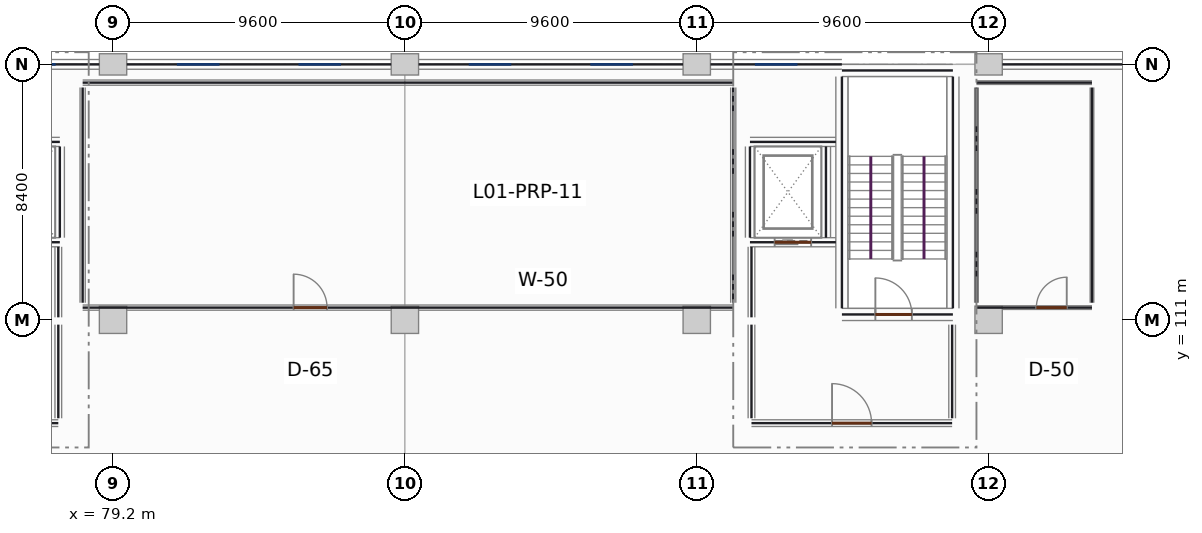
"""IFC4 building model, lengths in metres.
Left out: names, types, materials, properties, quantities, classifications, styles, units other than length and angle.
Written with IfcOpenShell. Run it as: python <this file> out.ifc"""

import sys

from ifc_helpers import new_model, si_unit, direction, frame, frame_2d, origin, origin_2d, place, context, subcontext, project, spatial, rectangle, extrude, element, fill, save


model = new_model("IFC4")
c1 = context("Model", 3, precision=1e-05, world=origin(), true_north=direction((0.0, 1.0)))
c2 = subcontext(c1, "Body", "Model", "MODEL_VIEW")
j1 = project(units=[si_unit("LENGTHUNIT", "METRE"), si_unit("PLANEANGLEUNIT", "RADIAN")], contexts=[c1])
p1 = place(None, origin())
s1 = spatial("IfcSite", under=j1, at=p1, CompositionType="ELEMENT")
p2 = place(p1, origin())
s2 = spatial("IfcBuilding", under=s1, at=p2, CompositionType="ELEMENT")
p3 = place(p2, frame((0.0, 0.0, 5.4)))
s3 = spatial("IfcBuildingStorey", under=s2, at=p3, CompositionType="ELEMENT", Elevation=5.4)
p4 = place(p3, frame((79.2, 111.0, 0.0), z_axis=(0.0, 0.0, 1.0), x_axis=(1.0, 0.0, 0.0)))
e1 = element("IfcColumn", 1, at=p4, inside=s3, PredefinedType="COLUMN", context=c2, shape_type="SweptSolid", body=[
    extrude(rectangle(XDim=0.9, YDim=0.9, at=origin_2d()), origin(), (0.0, 0.0, 1.0), 4.18),
])
p5 = place(p3, frame((79.2, 119.4, 0.0), z_axis=(0.0, 0.0, 1.0), x_axis=(1.0, 0.0, 0.0)))
e2 = element("IfcColumn", 2, at=p5, inside=s3, PredefinedType="COLUMN", context=c2, shape_type="SweptSolid", body=[
    extrude(rectangle(XDim=0.9, YDim=0.7, at=origin_2d()), origin(), (0.0, 0.0, 1.0), 4.18),
])
p6 = place(p3, frame((88.8, 111.0, 0.0), z_axis=(0.0, 0.0, 1.0), x_axis=(1.0, 0.0, 0.0)))
e3 = element("IfcColumn", 3, at=p6, inside=s3, PredefinedType="COLUMN", context=c2, shape_type="SweptSolid", body=[
    extrude(rectangle(XDim=0.9, YDim=0.9, at=origin_2d()), origin(), (0.0, 0.0, 1.0), 4.18),
])
p7 = place(p3, frame((88.8, 119.4, 0.0), z_axis=(0.0, 0.0, 1.0), x_axis=(1.0, 0.0, 0.0)))
e4 = element("IfcColumn", 4, at=p7, inside=s3, PredefinedType="COLUMN", context=c2, shape_type="SweptSolid", body=[
    extrude(rectangle(XDim=0.9, YDim=0.7, at=origin_2d()), origin(), (0.0, 0.0, 1.0), 4.18),
])
p8 = place(p3, frame((98.4, 111.0, 0.0), z_axis=(0.0, 0.0, 1.0), x_axis=(1.0, 0.0, 0.0)))
e5 = element("IfcColumn", 5, at=p8, inside=s3, PredefinedType="COLUMN", context=c2, shape_type="SweptSolid", body=[
    extrude(rectangle(XDim=0.9, YDim=0.9, at=origin_2d()), origin(), (0.0, 0.0, 1.0), 4.18),
])
p9 = place(p3, frame((98.4, 119.4, 0.0), z_axis=(0.0, 0.0, 1.0), x_axis=(1.0, 0.0, 0.0)))
e6 = element("IfcColumn", 6, at=p9, inside=s3, PredefinedType="COLUMN", context=c2, shape_type="SweptSolid", body=[
    extrude(rectangle(XDim=0.9, YDim=0.7, at=origin_2d()), origin(), (0.0, 0.0, 1.0), 4.18),
])
p10 = place(p3, frame((108.0, 111.0, 0.0), z_axis=(0.0, 0.0, 1.0), x_axis=(1.0, 0.0, 0.0)))
e7 = element("IfcColumn", 7, at=p10, inside=s3, PredefinedType="COLUMN", context=c2, shape_type="SweptSolid", body=[
    extrude(rectangle(XDim=0.9, YDim=0.9, at=origin_2d()), origin(), (0.0, 0.0, 1.0), 4.18),
])
p11 = place(p3, frame((108.0, 119.4, 0.0), z_axis=(0.0, 0.0, 1.0), x_axis=(1.0, 0.0, 0.0)))
e8 = element("IfcColumn", 8, at=p11, inside=s3, PredefinedType="COLUMN", context=c2, shape_type="SweptSolid", body=[
    extrude(rectangle(XDim=0.9, YDim=0.7, at=origin_2d()), origin(), (0.0, 0.0, 1.0), 4.18),
])
p12 = place(p3, frame((74.476, 119.4, 0.0), z_axis=(0.0, 0.0, 1.0), x_axis=(1.0, 0.0, 0.0)))
e9 = element("IfcWall", 9, at=p12, inside=s3, PredefinedType="SOLIDWALL", context=c2, shape_type="SweptSolid", body=[
    extrude(rectangle(XDim=4.272, YDim=0.32, at=frame_2d((2.136, 0.0))), origin(), (0.0, 0.0, 1.0), 3.38),
])
p13 = place(p12, frame((1.436, 0.0, 0.9)))
e10 = element("IfcOpeningElement", 10, at=p13, cuts=e9, PredefinedType="OPENING", context=c2, shape_type="SweptSolid", body=[
    extrude(rectangle(XDim=1.4, YDim=1.65, at=frame_2d((0.7, 0.825))), frame((0.0, 0.17, 0.0), z_axis=(0.0, -1.0, 0.0), x_axis=(1.0, 0.0, 0.0)), (0.0, 0.0, 1.0), 0.34),
])
p14 = place(p3, frame((79.652, 119.4, 0.0), z_axis=(0.0, 0.0, 1.0), x_axis=(1.0, 0.0, 0.0)))
e11 = element("IfcWall", 11, at=p14, inside=s3, PredefinedType="SOLIDWALL", context=c2, shape_type="SweptSolid", body=[
    extrude(rectangle(XDim=8.696, YDim=0.32, at=frame_2d((4.348, 0.0))), origin(), (0.0, 0.0, 1.0), 3.38),
])
p15 = place(p14, frame((1.648, 0.0, 0.85)))
e12 = element("IfcOpeningElement", 12, at=p15, cuts=e11, PredefinedType="OPENING", context=c2, shape_type="SweptSolid", body=[
    extrude(rectangle(XDim=1.4, YDim=1.65, at=frame_2d((0.7, 0.825))), frame((0.0, 0.17, 0.0), z_axis=(0.0, -1.0, 0.0), x_axis=(1.0, 0.0, 0.0)), (0.0, 0.0, 1.0), 0.34),
])
p16 = place(p14, frame((5.648, 0.0, 0.85)))
e13 = element("IfcOpeningElement", 13, at=p16, cuts=e11, PredefinedType="OPENING", context=c2, shape_type="SweptSolid", body=[
    extrude(rectangle(XDim=1.4, YDim=1.65, at=frame_2d((0.7, 0.825))), frame((0.0, 0.17, 0.0), z_axis=(0.0, -1.0, 0.0), x_axis=(1.0, 0.0, 0.0)), (0.0, 0.0, 1.0), 0.34),
])
p17 = place(p3, frame((89.252, 119.4, 0.0), z_axis=(0.0, 0.0, 1.0), x_axis=(1.0, 0.0, 0.0)))
e14 = element("IfcWall", 14, at=p17, inside=s3, PredefinedType="SOLIDWALL", context=c2, shape_type="SweptSolid", body=[
    extrude(rectangle(XDim=8.696, YDim=0.32, at=frame_2d((4.348, 0.0))), origin(), (0.0, 0.0, 1.0), 3.38),
])
p18 = place(p17, frame((1.648, 0.0, 0.85)))
e15 = element("IfcOpeningElement", 15, at=p18, cuts=e14, PredefinedType="OPENING", context=c2, shape_type="SweptSolid", body=[
    extrude(rectangle(XDim=1.4, YDim=1.65, at=frame_2d((0.7, 0.825))), frame((0.0, 0.17, 0.0), z_axis=(0.0, -1.0, 0.0), x_axis=(1.0, 0.0, 0.0)), (0.0, 0.0, 1.0), 0.34),
])
p19 = place(p17, frame((5.648, 0.0, 0.85)))
e16 = element("IfcOpeningElement", 16, at=p19, cuts=e14, PredefinedType="OPENING", context=c2, shape_type="SweptSolid", body=[
    extrude(rectangle(XDim=1.4, YDim=1.65, at=frame_2d((0.7, 0.825))), frame((0.0, 0.17, 0.0), z_axis=(0.0, -1.0, 0.0), x_axis=(1.0, 0.0, 0.0)), (0.0, 0.0, 1.0), 0.34),
])
p20 = place(p3, frame((98.852, 119.4, 0.0), z_axis=(0.0, 0.0, 1.0), x_axis=(1.0, 0.0, 0.0)))
e17 = element("IfcWall", 17, at=p20, inside=s3, PredefinedType="SOLIDWALL", context=c2, shape_type="SweptSolid", body=[
    extrude(rectangle(XDim=4.322, YDim=0.32, at=frame_2d((2.161, 0.0))), origin(), (0.0, 0.0, 1.0), 3.38),
])
p21 = place(p20, frame((1.461, 0.0, 0.9)))
e18 = element("IfcOpeningElement", 18, at=p21, cuts=e17, PredefinedType="OPENING", context=c2, shape_type="SweptSolid", body=[
    extrude(rectangle(XDim=1.4, YDim=1.65, at=frame_2d((0.7, 0.825))), frame((0.0, 0.17, 0.0), z_axis=(0.0, -1.0, 0.0), x_axis=(1.0, 0.0, 0.0)), (0.0, 0.0, 1.0), 0.34),
])
p22 = place(p3, frame((108.452, 119.4, 0.0), z_axis=(0.0, 0.0, 1.0), x_axis=(1.0, 0.0, 0.0)))
e19 = element("IfcWall", 19, at=p22, inside=s3, PredefinedType="SOLIDWALL", context=c2, shape_type="SweptSolid", body=[
    extrude(rectangle(XDim=8.696, YDim=0.32, at=frame_2d((4.348, 0.0))), origin(), (0.0, 0.0, 1.0), 3.38),
])
p23 = place(p22, frame((5.648, 0.0, 0.85)))
e20 = element("IfcOpeningElement", 20, at=p23, cuts=e19, PredefinedType="OPENING", context=c2, shape_type="SweptSolid", body=[
    extrude(rectangle(XDim=1.4, YDim=1.65, at=frame_2d((0.7, 0.825))), frame((0.0, 0.17, 0.0), z_axis=(0.0, -1.0, 0.0), x_axis=(1.0, 0.0, 0.0)), (0.0, 0.0, 1.0), 0.34),
])
p24 = place(p3, frame((103.175, 111.175, 0.0), z_axis=(0.0, 0.0, 1.0), x_axis=(1.0, 0.0, 0.0)))
e21 = element("IfcWall", 21, at=p24, inside=s3, PredefinedType="SHEAR", context=c2, shape_type="SweptSolid", body=[
    extrude(rectangle(XDim=3.65, YDim=0.4, at=frame_2d((1.825, 0.0))), origin(), (0.0, 0.0, 1.0), 4.18),
])
p25 = place(p24, frame((1.1, 0.0, 0.0)))
e22 = element("IfcOpeningElement", 22, at=p25, cuts=e21, PredefinedType="OPENING", context=c2, shape_type="SweptSolid", body=[
    extrude(rectangle(XDim=1.2, YDim=2.2, at=frame_2d((0.6, 1.1))), frame((0.0, 0.21, 0.0), z_axis=(0.0, -1.0, 0.0), x_axis=(1.0, 0.0, 0.0)), (0.0, 0.0, 1.0), 0.42),
])
for number, where, z_axis, x_axis in (
    (23, (103.175, 111.375, 0.0), (0.0, 0.0, 1.0), (0.0, 1.0, 0.0)),
    (24, (106.825, 111.375, 0.0), (0.0, 0.0, 1.0), (0.0, 1.0, 0.0)),
):
    element("IfcWall", number, at=place(p3, frame(where, z_axis=z_axis, x_axis=x_axis)), inside=s3, PredefinedType="SHEAR", context=c2, shape_type="SweptSolid", body=[
        extrude(rectangle(XDim=7.625, YDim=0.4, at=frame_2d((3.812, 0.0))), origin(), (0.0, 0.0, 1.0), 4.18),
    ])
p26 = place(p3, frame((103.175, 119.2, 0.0), z_axis=(0.0, 0.0, 1.0), x_axis=(1.0, 0.0, 0.0)))
e25 = element("IfcWall", 25, at=p26, inside=s3, PredefinedType="SHEAR", context=c2, shape_type="SweptSolid", body=[
    extrude(rectangle(XDim=3.65, YDim=0.4, at=frame_2d((1.825, 0.0))), origin(), (0.0, 0.0, 1.0), 4.18),
])
p27 = place(p3, frame((74.7, 113.55, 0.0), z_axis=(0.0, 0.0, 1.0), x_axis=(1.0, 0.0, 0.0)))
e26 = element("IfcWall", 26, at=p27, inside=s3, PredefinedType="SHEAR", context=c2, shape_type="SweptSolid", body=[
    extrude(rectangle(XDim=2.75, YDim=0.3, at=frame_2d((1.375, 0.0))), origin(), (0.0, 0.0, 1.0), 4.18),
])
p28 = place(p27, frame((0.775, 0.0, 0.0)))
e27 = element("IfcOpeningElement", 27, at=p28, cuts=e26, PredefinedType="OPENING", context=c2, shape_type="SweptSolid", body=[
    extrude(rectangle(XDim=1.2, YDim=2.2, at=frame_2d((0.6, 1.1))), frame((0.0, 0.16, 0.0), z_axis=(0.0, -1.0, 0.0), x_axis=(1.0, 0.0, 0.0)), (0.0, 0.0, 1.0), 0.32),
])
p29 = place(p3, frame((74.7, 116.85, 0.0), z_axis=(0.0, 0.0, 1.0), x_axis=(1.0, 0.0, 0.0)))
e28 = element("IfcWall", 28, at=p29, inside=s3, PredefinedType="SHEAR", context=c2, shape_type="SweptSolid", body=[
    extrude(rectangle(XDim=2.75, YDim=0.3, at=frame_2d((1.375, 0.0))), origin(), (0.0, 0.0, 1.0), 4.18),
])
p30 = place(p3, frame((77.45, 113.7, 0.0), z_axis=(0.0, 0.0, 1.0), x_axis=(0.0, 1.0, 0.0)))
e29 = element("IfcWall", 29, at=p30, inside=s3, PredefinedType="SHEAR", context=c2, shape_type="SweptSolid", body=[
    extrude(rectangle(XDim=3.0, YDim=0.3, at=frame_2d((1.5, 0.0))), origin(), (0.0, 0.0, 1.0), 4.18),
])
p31 = place(p3, frame((100.15, 113.55, 0.0), z_axis=(0.0, 0.0, 1.0), x_axis=(1.0, 0.0, 0.0)))
e30 = element("IfcWall", 30, at=p31, inside=s3, PredefinedType="SHEAR", context=c2, shape_type="SweptSolid", body=[
    extrude(rectangle(XDim=2.825, YDim=0.3, at=frame_2d((1.413, 0.0))), origin(), (0.0, 0.0, 1.0), 4.18),
])
p32 = place(p31, frame((0.812, 0.0, 0.0)))
e31 = element("IfcOpeningElement", 31, at=p32, cuts=e30, PredefinedType="OPENING", context=c2, shape_type="SweptSolid", body=[
    extrude(rectangle(XDim=1.2, YDim=2.2, at=frame_2d((0.6, 1.1))), frame((0.0, 0.16, 0.0), z_axis=(0.0, -1.0, 0.0), x_axis=(1.0, 0.0, 0.0)), (0.0, 0.0, 1.0), 0.32),
])
p33 = place(p3, frame((100.15, 116.85, 0.0), z_axis=(0.0, 0.0, 1.0), x_axis=(1.0, 0.0, 0.0)))
e32 = element("IfcWall", 32, at=p33, inside=s3, PredefinedType="SHEAR", context=c2, shape_type="SweptSolid", body=[
    extrude(rectangle(XDim=2.825, YDim=0.3, at=frame_2d((1.413, 0.0))), origin(), (0.0, 0.0, 1.0), 4.18),
])
for number, where, z_axis, x_axis in (
    (33, (100.15, 113.7, 0.0), (0.0, 0.0, 1.0), (0.0, 1.0, 0.0)),
    (34, (102.65, 113.7, 0.0), (0.0, 0.0, 1.0), (0.0, 1.0, 0.0)),
):
    element("IfcWall", number, at=place(p3, frame(where, z_axis=z_axis, x_axis=x_axis)), inside=s3, PredefinedType="SHEAR", context=c2, shape_type="SweptSolid", body=[
        extrude(rectangle(XDim=3.0, YDim=0.3, at=frame_2d((1.5, 0.0))), origin(), (0.0, 0.0, 1.0), 4.18),
    ])
p34 = place(p3, frame((70.8, 107.6, 0.0), z_axis=(0.0, 0.0, 1.0), x_axis=(1.0, 0.0, 0.0)))
e35 = element("IfcWall", 35, at=p34, inside=s3, PredefinedType="PARTITIONING", context=c2, shape_type="SweptSolid", body=[
    extrude(rectangle(XDim=6.6, YDim=0.22, at=frame_2d((3.3, 0.0))), origin(), (0.0, 0.0, 1.0), 3.22),
])
p35 = place(p34, frame((2.65, 0.0, 0.0)))
e36 = element("IfcOpeningElement", 36, at=p35, cuts=e35, PredefinedType="OPENING", context=c2, shape_type="SweptSolid", body=[
    extrude(rectangle(XDim=1.3, YDim=2.2, at=frame_2d((0.65, 1.1))), frame((0.0, 0.12, 0.0), z_axis=(0.0, -1.0, 0.0), x_axis=(1.0, 0.0, 0.0)), (0.0, 0.0, 1.0), 0.24),
])
p36 = place(p3, frame((77.4, 111.08, 0.0), z_axis=(0.0, 0.0, 1.0), x_axis=(0.0, 1.0, 0.0)))
e37 = element("IfcWall", 37, at=p36, inside=s3, PredefinedType="PARTITIONING", context=c2, shape_type="SweptSolid", body=[
    extrude(rectangle(XDim=2.32, YDim=0.22, at=frame_2d((1.16, 0.0))), origin(), (0.0, 0.0, 1.0), 3.22),
])
p37 = place(p3, frame((77.4, 107.76, 0.0), z_axis=(0.0, 0.0, 1.0), x_axis=(0.0, 1.0, 0.0)))
e38 = element("IfcWall", 38, at=p37, inside=s3, PredefinedType="PARTITIONING", context=c2, shape_type="SweptSolid", body=[
    extrude(rectangle(XDim=3.08, YDim=0.22, at=frame_2d((1.54, 0.0))), origin(), (0.0, 0.0, 1.0), 3.22),
])
p38 = place(p3, frame((100.2, 107.6, 0.0), z_axis=(0.0, 0.0, 1.0), x_axis=(1.0, 0.0, 0.0)))
e39 = element("IfcWall", 39, at=p38, inside=s3, PredefinedType="PARTITIONING", context=c2, shape_type="SweptSolid", body=[
    extrude(rectangle(XDim=6.6, YDim=0.22, at=frame_2d((3.3, 0.0))), origin(), (0.0, 0.0, 1.0), 3.22),
])
p39 = place(p38, frame((2.65, 0.0, 0.0)))
e40 = element("IfcOpeningElement", 40, at=p39, cuts=e39, PredefinedType="OPENING", context=c2, shape_type="SweptSolid", body=[
    extrude(rectangle(XDim=1.3, YDim=2.2, at=frame_2d((0.65, 1.1))), frame((0.0, 0.12, 0.0), z_axis=(0.0, -1.0, 0.0), x_axis=(1.0, 0.0, 0.0)), (0.0, 0.0, 1.0), 0.24),
])
p40 = place(p3, frame((100.2, 111.08, 0.0), z_axis=(0.0, 0.0, 1.0), x_axis=(0.0, 1.0, 0.0)))
e41 = element("IfcWall", 41, at=p40, inside=s3, PredefinedType="PARTITIONING", context=c2, shape_type="SweptSolid", body=[
    extrude(rectangle(XDim=2.32, YDim=0.22, at=frame_2d((1.16, 0.0))), origin(), (0.0, 0.0, 1.0), 3.22),
])
for number, where, z_axis, x_axis in (
    (42, (100.2, 107.76, 0.0), (0.0, 0.0, 1.0), (0.0, 1.0, 0.0)),
    (43, (106.8, 107.76, 0.0), (0.0, 0.0, 1.0), (0.0, 1.0, 0.0)),
):
    element("IfcWall", number, at=place(p3, frame(where, z_axis=z_axis, x_axis=x_axis)), inside=s3, PredefinedType="PARTITIONING", context=c2, shape_type="SweptSolid", body=[
        extrude(rectangle(XDim=3.08, YDim=0.22, at=frame_2d((1.54, 0.0))), origin(), (0.0, 0.0, 1.0), 3.22),
    ])
p41 = place(p3, frame((78.2, 111.4, 0.0), z_axis=(0.0, 0.0, 1.0), x_axis=(1.0, 0.0, 0.0)))
e44 = element("IfcWall", 44, at=p41, inside=s3, PredefinedType="PARTITIONING", context=c2, shape_type="SweptSolid", body=[
    extrude(rectangle(XDim=21.4, YDim=0.17, at=frame_2d((10.7, 0.0))), origin(), (0.0, 0.0, 1.0), 3.22),
])
p42 = place(p41, frame((6.94, 0.0, 0.0)))
e45 = element("IfcOpeningElement", 45, at=p42, cuts=e44, PredefinedType="OPENING", context=c2, shape_type="SweptSolid", body=[
    extrude(rectangle(XDim=1.1, YDim=2.2, at=frame_2d((0.55, 1.1))), frame((0.0, 0.095, 0.0), z_axis=(0.0, -1.0, 0.0), x_axis=(1.0, 0.0, 0.0)), (0.0, 0.0, 1.0), 0.19),
])
p43 = place(p3, frame((78.2, 118.8, 0.0), z_axis=(0.0, 0.0, 1.0), x_axis=(1.0, 0.0, 0.0)))
e46 = element("IfcWall", 46, at=p43, inside=s3, PredefinedType="PARTITIONING", context=c2, shape_type="SweptSolid", body=[
    extrude(rectangle(XDim=21.4, YDim=0.17, at=frame_2d((10.7, 0.0))), origin(), (0.0, 0.0, 1.0), 3.22),
])
for number, where, z_axis, x_axis in (
    (47, (78.2, 111.56, 0.0), (0.0, 0.0, 1.0), (0.0, 1.0, 0.0)),
    (48, (99.6, 111.56, 0.0), (0.0, 0.0, 1.0), (0.0, 1.0, 0.0)),
):
    element("IfcWall", number, at=place(p3, frame(where, z_axis=z_axis, x_axis=x_axis)), inside=s3, PredefinedType="PARTITIONING", context=c2, shape_type="SweptSolid", body=[
        extrude(rectangle(XDim=7.08, YDim=0.17, at=frame_2d((3.54, 0.0))), origin(), (0.0, 0.0, 1.0), 3.22),
    ])
p44 = place(p3, frame((107.6, 111.4, 0.0), z_axis=(0.0, 0.0, 1.0), x_axis=(1.0, 0.0, 0.0)))
e49 = element("IfcWall", 49, at=p44, inside=s3, PredefinedType="PARTITIONING", context=c2, shape_type="SweptSolid", body=[
    extrude(rectangle(XDim=3.8, YDim=0.12, at=frame_2d((1.9, 0.0))), origin(), (0.0, 0.0, 1.0), 3.22),
])
p45 = place(p44, frame((1.97, 0.0, 0.0)))
e50 = element("IfcOpeningElement", 50, at=p45, cuts=e49, PredefinedType="OPENING", context=c2, shape_type="SweptSolid", body=[
    extrude(rectangle(XDim=1.0, YDim=2.15, at=frame_2d((0.5, 1.075))), frame((0.0, 0.07, 0.0), z_axis=(0.0, -1.0, 0.0), x_axis=(1.0, 0.0, 0.0)), (0.0, 0.0, 1.0), 0.14),
])
p46 = place(p3, frame((107.6, 118.8, 0.0), z_axis=(0.0, 0.0, 1.0), x_axis=(1.0, 0.0, 0.0)))
e51 = element("IfcWall", 51, at=p46, inside=s3, PredefinedType="PARTITIONING", context=c2, shape_type="SweptSolid", body=[
    extrude(rectangle(XDim=3.8, YDim=0.12, at=frame_2d((1.9, 0.0))), origin(), (0.0, 0.0, 1.0), 3.22),
])
for number, where, z_axis, x_axis in (
    (52, (107.6, 111.56, 0.0), (0.0, 0.0, 1.0), (0.0, 1.0, 0.0)),
    (53, (111.4, 111.56, 0.0), (0.0, 0.0, 1.0), (0.0, 1.0, 0.0)),
):
    element("IfcWall", number, at=place(p3, frame(where, z_axis=z_axis, x_axis=x_axis)), inside=s3, PredefinedType="PARTITIONING", context=c2, shape_type="SweptSolid", body=[
        extrude(rectangle(XDim=7.08, YDim=0.12, at=frame_2d((3.54, 0.0))), origin(), (0.0, 0.0, 1.0), 3.22),
    ])
p47 = place(p13, origin())
e54 = element("IfcWindow", 54, at=p47, inside=s3, PartitioningType="SINGLE_PANEL", PredefinedType="WINDOW", context=c2, shape_type="SweptSolid", body=[
    extrude(rectangle(XDim=1.4, YDim=1.65, at=frame_2d((0.7, 0.825))), frame((0.0, 0.03, 0.0), z_axis=(0.0, -1.0, 0.0), x_axis=(1.0, 0.0, 0.0)), (0.0, 0.0, 1.0), 0.06),
])
fill(e10, e54)
p48 = place(p15, origin())
e55 = element("IfcWindow", 55, at=p48, inside=s3, PartitioningType="SINGLE_PANEL", PredefinedType="WINDOW", context=c2, shape_type="SweptSolid", body=[
    extrude(rectangle(XDim=1.4, YDim=1.65, at=frame_2d((0.7, 0.825))), frame((0.0, 0.03, 0.0), z_axis=(0.0, -1.0, 0.0), x_axis=(1.0, 0.0, 0.0)), (0.0, 0.0, 1.0), 0.06),
])
fill(e12, e55)
p49 = place(p16, origin())
e56 = element("IfcWindow", 56, at=p49, inside=s3, PartitioningType="SINGLE_PANEL", PredefinedType="WINDOW", context=c2, shape_type="SweptSolid", body=[
    extrude(rectangle(XDim=1.4, YDim=1.65, at=frame_2d((0.7, 0.825))), frame((0.0, 0.03, 0.0), z_axis=(0.0, -1.0, 0.0), x_axis=(1.0, 0.0, 0.0)), (0.0, 0.0, 1.0), 0.06),
])
fill(e13, e56)
p50 = place(p18, origin())
e57 = element("IfcWindow", 57, at=p50, inside=s3, PartitioningType="SINGLE_PANEL", PredefinedType="WINDOW", context=c2, shape_type="SweptSolid", body=[
    extrude(rectangle(XDim=1.4, YDim=1.65, at=frame_2d((0.7, 0.825))), frame((0.0, 0.03, 0.0), z_axis=(0.0, -1.0, 0.0), x_axis=(1.0, 0.0, 0.0)), (0.0, 0.0, 1.0), 0.06),
])
fill(e15, e57)
p51 = place(p19, origin())
e58 = element("IfcWindow", 58, at=p51, inside=s3, PartitioningType="SINGLE_PANEL", PredefinedType="WINDOW", context=c2, shape_type="SweptSolid", body=[
    extrude(rectangle(XDim=1.4, YDim=1.65, at=frame_2d((0.7, 0.825))), frame((0.0, 0.03, 0.0), z_axis=(0.0, -1.0, 0.0), x_axis=(1.0, 0.0, 0.0)), (0.0, 0.0, 1.0), 0.06),
])
fill(e16, e58)
p52 = place(p21, origin())
e59 = element("IfcWindow", 59, at=p52, inside=s3, PartitioningType="SINGLE_PANEL", PredefinedType="WINDOW", context=c2, shape_type="SweptSolid", body=[
    extrude(rectangle(XDim=1.4, YDim=1.65, at=frame_2d((0.7, 0.825))), frame((0.0, 0.03, 0.0), z_axis=(0.0, -1.0, 0.0), x_axis=(1.0, 0.0, 0.0)), (0.0, 0.0, 1.0), 0.06),
])
fill(e18, e59)
p53 = place(p25, origin())
e60 = element("IfcDoor", 60, at=p53, inside=s3, OperationType="SINGLE_SWING_LEFT", PredefinedType="DOOR", context=c2, shape_type="SweptSolid", body=[
    extrude(rectangle(XDim=1.2, YDim=2.2, at=frame_2d((0.6, 1.1))), frame((0.0, 0.025, 0.0), z_axis=(0.0, -1.0, 0.0), x_axis=(1.0, 0.0, 0.0)), (0.0, 0.0, 1.0), 0.05),
])
fill(e22, e60)
p54 = place(p32, origin())
e61 = element("IfcDoor", 61, at=p54, inside=s3, OperationType="SLIDING_TO_LEFT", PredefinedType="DOOR", context=c2, shape_type="SweptSolid", body=[
    extrude(rectangle(XDim=1.2, YDim=2.2, at=frame_2d((0.6, 1.1))), frame((0.0, 0.025, 0.0), z_axis=(0.0, -1.0, 0.0), x_axis=(1.0, 0.0, 0.0)), (0.0, 0.0, 1.0), 0.05),
])
fill(e31, e61)
p55 = place(p39, origin())
e62 = element("IfcDoor", 62, at=p55, inside=s3, OperationType="SINGLE_SWING_LEFT", PredefinedType="DOOR", context=c2, shape_type="SweptSolid", body=[
    extrude(rectangle(XDim=1.3, YDim=2.2, at=frame_2d((0.65, 1.1))), frame((0.0, 0.025, 0.0), z_axis=(0.0, -1.0, 0.0), x_axis=(1.0, 0.0, 0.0)), (0.0, 0.0, 1.0), 0.05),
])
fill(e40, e62)
p56 = place(p42, origin())
e63 = element("IfcDoor", 63, at=p56, inside=s3, OperationType="SINGLE_SWING_LEFT", PredefinedType="DOOR", context=c2, shape_type="SweptSolid", body=[
    extrude(rectangle(XDim=1.1, YDim=2.2, at=frame_2d((0.55, 1.1))), frame((0.0, 0.025, 0.0), z_axis=(0.0, -1.0, 0.0), x_axis=(1.0, 0.0, 0.0)), (0.0, 0.0, 1.0), 0.05),
])
fill(e45, e63)
p57 = place(p45, origin())
e64 = element("IfcDoor", 64, at=p57, inside=s3, OperationType="SINGLE_SWING_RIGHT", PredefinedType="DOOR", context=c2, shape_type="SweptSolid", body=[
    extrude(rectangle(XDim=1.0, YDim=2.15, at=frame_2d((0.5, 1.075))), frame((0.0, 0.025, 0.0), z_axis=(0.0, -1.0, 0.0), x_axis=(1.0, 0.0, 0.0)), (0.0, 0.0, 1.0), 0.05),
])
fill(e50, e64)
save(model, sys.argv[1])
